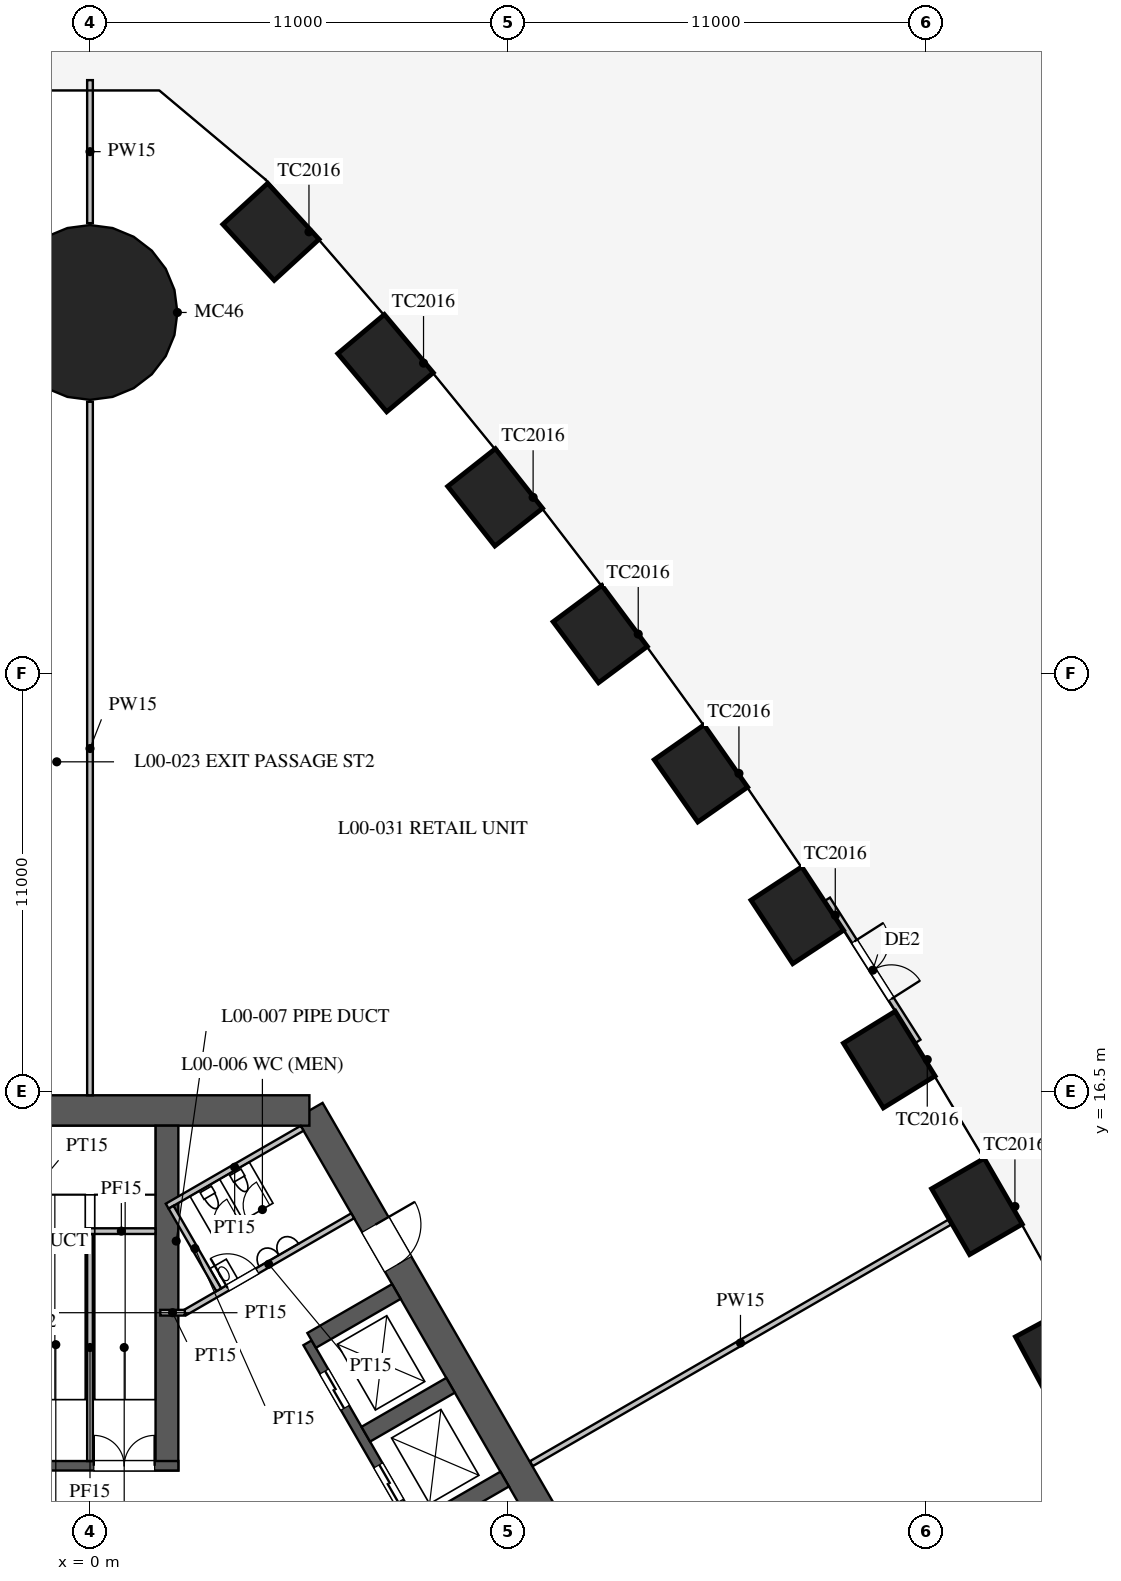
"""IFC4 building model, lengths in metres.
Left out: names, types, materials, properties, quantities, classifications, styles, units other than length and angle.
Written with IfcOpenShell. Run it as: python <this file> out.ifc"""

import sys

from ifc_helpers import new_model, si_unit, direction, frame, frame_2d, origin, origin_2d, place, context, subcontext, project, spatial, polyline, rectangle, circle, outline, extrude, element, fill, save


model = new_model("IFC4")
c1 = context("Model", 3, precision=1e-05, world=origin(), true_north=direction((0.0, 1.0)))
c2 = subcontext(c1, "Body", "Model", "MODEL_VIEW")
j1 = project(units=[si_unit("LENGTHUNIT", "METRE"), si_unit("PLANEANGLEUNIT", "RADIAN")], contexts=[c1])
p1 = place(None, origin())
s1 = spatial("IfcSite", under=j1, at=p1, CompositionType="ELEMENT")
p2 = place(p1, origin())
s2 = spatial("IfcBuilding", under=s1, at=p2, CompositionType="ELEMENT")
p3 = place(p2, origin())
s3 = spatial("IfcBuildingStorey", under=s2, at=p3, CompositionType="ELEMENT", Elevation=0.0)
for number, where, z_axis, x_axis in (
    (1, (25.531, 9.544, 0.0), (0.0, 0.0, 1.0), (-0.475, 0.88, 0.0)),
    (2, (23.338, 13.474, 0.0), (0.0, 0.0, 1.0), (-0.5, 0.866, 0.0)),
    (3, (21.031, 17.339, 0.0), (0.0, 0.0, 1.0), (-0.525, 0.851, 0.0)),
    (4, (18.611, 21.137, 0.0), (0.0, 0.0, 1.0), (-0.549, 0.836, 0.0)),
    (5, (16.076, 24.87, 0.0), (0.0, 0.0, 1.0), (-0.574, 0.819, 0.0)),
    (6, (13.426, 28.536, 0.0), (0.0, 0.0, 1.0), (-0.597, 0.802, 0.0)),
    (7, (10.66, 32.135, 0.0), (0.0, 0.0, 1.0), (-0.62, 0.784, 0.0)),
    (8, (7.776, 35.667, 0.0), (0.0, 0.0, 1.0), (-0.643, 0.766, 0.0)),
    (9, (4.762, 39.122, 0.0), (0.0, 0.0, 1.0), (-0.676, 0.737, 0.0)),
):
    element("IfcColumn", number, at=place(p3, frame(where, z_axis=z_axis, x_axis=x_axis)), inside=s3, PredefinedType="COLUMN", context=c2, shape_type="SweptSolid", body=[
        extrude(rectangle(XDim=2.0, YDim=1.6, at=origin_2d()), origin(), (0.0, 0.0, 1.0), 6.5),
    ])
p4 = place(p3, frame((0.0, 37.0, 0.0), z_axis=(0.0, 0.0, 1.0), x_axis=(1.0, 0.0, 0.0)))
e10 = element("IfcColumn", 10, at=p4, inside=s3, PredefinedType="COLUMN", context=c2, shape_type="SweptSolid", body=[
    extrude(circle(Radius=2.3, at=origin_2d()), origin(), (0.0, 0.0, 1.0), 6.5),
])
p5 = place(p3, frame((16.743, -3.0, 0.0), z_axis=(0.0, 0.0, 1.0), x_axis=(-0.500002442456, 0.866023993627, 0.0)))
e11 = element("IfcWall", 11, at=p5, inside=s3, PredefinedType="SHEAR", context=c2, shape_type="SweptSolid", body=[
    extrude(rectangle(XDim=21.939, YDim=0.8, at=frame_2d((10.97, 0.0))), origin(), (0.0, 0.0, 1.0), 6.5),
])
p6 = place(p5, frame((17.27, 0.0, 0.0)))
e12 = element("IfcOpeningElement", 12, at=p6, cuts=e11, PredefinedType="OPENING", context=c2, shape_type="SweptSolid", body=[
    extrude(rectangle(XDim=1.2, YDim=2.1, at=frame_2d((0.6, 1.05))), frame((0.0, 0.41, 0.0), z_axis=(0.0, -1.0, 0.0), x_axis=(1.0, 0.0, 0.0)), (0.0, 0.0, 1.0), 0.82),
])
p7 = place(p5, frame((3.27, 0.0, 0.0)))
e13 = element("IfcOpeningElement", 13, at=p7, cuts=e11, PredefinedType="OPENING", context=c2, shape_type="SweptSolid", body=[
    extrude(rectangle(XDim=1.6, YDim=2.1, at=frame_2d((0.8, 1.05))), frame((0.0, 0.41, 0.0), z_axis=(0.0, -1.0, 0.0), x_axis=(1.0, 0.0, 0.0)), (0.0, 0.0, 1.0), 0.82),
])
p8 = place(p3, frame((5.773, 16.0, 0.0), z_axis=(0.0, 0.0, 1.0), x_axis=(-1.0, 0.0, 0.0)))
e14 = element("IfcWall", 14, at=p8, inside=s3, PredefinedType="SHEAR", context=c2, shape_type="SweptSolid", body=[
    extrude(rectangle(XDim=11.547, YDim=0.8, at=frame_2d((5.773, 0.0))), origin(), (0.0, 0.0, 1.0), 6.5),
])
p9 = place(p3, frame((11.424, 0.014, 0.0), z_axis=(0.0, 0.0, 1.0), x_axis=(-0.500001763848, 0.866024385424, 0.0)))
e15 = element("IfcWall", 15, at=p9, inside=s3, PredefinedType="SHEAR", context=c2, shape_type="SweptSolid", body=[
    extrude(rectangle(XDim=11.4, YDim=0.25, at=frame_2d((5.7, 0.0))), origin(), (0.0, 0.0, 1.0), 6.5),
])
p10 = place(p9, frame((0.875, 0.0, 0.0)))
e16 = element("IfcOpeningElement", 16, at=p10, cuts=e15, PredefinedType="OPENING", context=c2, shape_type="SweptSolid", body=[
    extrude(rectangle(XDim=1.1, YDim=2.2, at=frame_2d((0.55, 1.1))), frame((0.0, 0.135, 0.0), z_axis=(0.0, -1.0, 0.0), x_axis=(1.0, 0.0, 0.0)), (0.0, 0.0, 1.0), 0.27),
])
p11 = place(p9, frame((3.725, 0.0, 0.0)))
e17 = element("IfcOpeningElement", 17, at=p11, cuts=e15, PredefinedType="OPENING", context=c2, shape_type="SweptSolid", body=[
    extrude(rectangle(XDim=1.1, YDim=2.2, at=frame_2d((0.55, 1.1))), frame((0.0, 0.135, 0.0), z_axis=(0.0, -1.0, 0.0), x_axis=(1.0, 0.0, 0.0)), (0.0, 0.0, 1.0), 0.27),
])
p12 = place(p9, frame((6.575, 0.0, 0.0)))
e18 = element("IfcOpeningElement", 18, at=p12, cuts=e15, PredefinedType="OPENING", context=c2, shape_type="SweptSolid", body=[
    extrude(rectangle(XDim=1.1, YDim=2.2, at=frame_2d((0.55, 1.1))), frame((0.0, 0.135, 0.0), z_axis=(0.0, -1.0, 0.0), x_axis=(1.0, 0.0, 0.0)), (0.0, 0.0, 1.0), 0.27),
])
p13 = place(p9, frame((9.425, 0.0, 0.0)))
e19 = element("IfcOpeningElement", 19, at=p13, cuts=e15, PredefinedType="OPENING", context=c2, shape_type="SweptSolid", body=[
    extrude(rectangle(XDim=1.1, YDim=2.2, at=frame_2d((0.55, 1.1))), frame((0.0, 0.135, 0.0), z_axis=(0.0, -1.0, 0.0), x_axis=(1.0, 0.0, 0.0)), (0.0, 0.0, 1.0), 0.27),
])
for number, where, z_axis, x_axis in (
    (20, (8.682, 5.012, 0.0), (0.0, 0.0, 1.0), (0.866, 0.5, 0.0)),
    (21, (7.257, 7.481, 0.0), (0.0, 0.0, 1.0), (0.866, 0.5, 0.0)),
):
    element("IfcWall", number, at=place(p3, frame(where, z_axis=z_axis, x_axis=x_axis)), inside=s3, PredefinedType="SHEAR", context=c2, shape_type="SweptSolid", body=[
        extrude(rectangle(XDim=2.575, YDim=0.45, at=frame_2d((1.288, 0.0))), origin(), (0.0, 0.0, 1.0), 6.5),
    ])
p14 = place(p3, frame((5.832, 9.949, 0.0), z_axis=(0.0, 0.0, 1.0), x_axis=(0.866029291668, 0.499993265928, 0.0)))
e22 = element("IfcWall", 22, at=p14, inside=s3, PredefinedType="SHEAR", context=c2, shape_type="SweptSolid", body=[
    extrude(rectangle(XDim=2.575, YDim=0.45, at=frame_2d((1.288, 0.0))), origin(), (0.0, 0.0, 1.0), 6.5),
])
p15 = place(p3, frame((2.025, 6.525, 0.0), z_axis=(0.0, 0.0, 1.0), x_axis=(0.0, 1.0, 0.0)))
e23 = element("IfcWall", 23, at=p15, inside=s3, PredefinedType="SHEAR", context=c2, shape_type="SweptSolid", body=[
    extrude(rectangle(XDim=9.075, YDim=0.6, at=frame_2d((4.538, 0.0))), origin(), (0.0, 0.0, 1.0), 6.5),
])
p16 = place(p3, frame((2.325, 6.65, 0.0), z_axis=(0.0, 0.0, 1.0), x_axis=(-1.0, 0.0, 0.0)))
e24 = element("IfcWall", 24, at=p16, inside=s3, PredefinedType="SHEAR", context=c2, shape_type="SweptSolid", body=[
    extrude(rectangle(XDim=4.65, YDim=0.25, at=frame_2d((2.325, 0.0))), origin(), (0.0, 0.0, 1.0), 6.5),
])
p17 = place(p16, frame((0.625, 0.0, 0.0)))
e25 = element("IfcOpeningElement", 25, at=p17, cuts=e24, PredefinedType="OPENING", context=c2, shape_type="SweptSolid", body=[
    extrude(rectangle(XDim=1.6, YDim=2.1, at=frame_2d((0.8, 1.05))), frame((0.0, 0.135, 0.0), z_axis=(0.0, -1.0, 0.0), x_axis=(1.0, 0.0, 0.0)), (0.0, 0.0, 1.0), 0.27),
])
p18 = place(p3, frame((21.79, 17.822, 0.0), z_axis=(0.0, 0.0, 1.0), x_axis=(-0.537210337964, 0.843448310677, 0.0)))
e26 = element("IfcWall", 26, at=p18, inside=s3, PredefinedType="SOLIDWALL", context=c2, shape_type="SweptSolid", body=[
    extrude(rectangle(XDim=4.434, YDim=0.15, at=frame_2d((2.217, 0.0))), origin(), (0.0, 0.0, 1.0), 6.48),
])
p19 = place(p18, frame((1.317, 0.0, 0.0)))
e27 = element("IfcOpeningElement", 27, at=p19, cuts=e26, PredefinedType="OPENING", context=c2, shape_type="SweptSolid", body=[
    extrude(rectangle(XDim=1.8, YDim=3.0, at=frame_2d((0.9, 1.5))), frame((0.0, 0.085, 0.0), z_axis=(0.0, -1.0, 0.0), x_axis=(1.0, 0.0, 0.0)), (0.0, 0.0, 1.0), 0.17),
])
p20 = place(p3, frame((2.495, 10.678, 0.0), z_axis=(0.0, 0.0, 1.0), x_axis=(0.86602216432, 0.500005610874, 0.0)))
e28 = element("IfcWall", 28, at=p20, inside=s3, PredefinedType="PARTITIONING", context=c2, shape_type="SweptSolid", body=[
    extrude(rectangle(XDim=5.1, YDim=0.15, at=frame_2d((2.55, 0.0))), origin(), (0.0, 0.0, 1.0), 6.3),
])
p21 = place(p20, frame((1.3, 0.0, 0.0)))
e29 = element("IfcOpeningElement", 29, at=p21, cuts=e28, PredefinedType="OPENING", context=c2, shape_type="SweptSolid", body=[
    extrude(rectangle(XDim=0.9, YDim=2.1, at=frame_2d((0.45, 1.05))), frame((0.0, 0.085, 0.0), z_axis=(0.0, -1.0, 0.0), x_axis=(1.0, 0.0, 0.0)), (0.0, 0.0, 1.0), 0.17),
])
p22 = place(p3, frame((2.495, 10.678, 0.0), z_axis=(0.0, 0.0, 1.0), x_axis=(-1.0, 0.0, 0.0)))
e30 = element("IfcWall", 30, at=p22, inside=s3, PredefinedType="PARTITIONING", context=c2, shape_type="SweptSolid", body=[
    extrude(rectangle(XDim=0.645, YDim=0.15, at=frame_2d((0.323, 0.0))), origin(), (0.0, 0.0, 1.0), 6.3),
])
p23 = place(p3, frame((2.031, 13.482, 0.0), z_axis=(0.0, 0.0, 1.0), x_axis=(0.866050731258, 0.499956128963, 0.0)))
e31 = element("IfcWall", 31, at=p23, inside=s3, PredefinedType="PARTITIONING", context=c2, shape_type="SweptSolid", body=[
    extrude(rectangle(XDim=4.1, YDim=0.15, at=frame_2d((2.05, 0.0))), origin(), (0.0, 0.0, 1.0), 6.3),
])
p24 = place(p3, frame((3.389, 11.281, 0.0), z_axis=(0.0, 0.0, 1.0), x_axis=(-0.499989096993, 0.866031698547, 0.0)))
e32 = element("IfcWall", 32, at=p24, inside=s3, PredefinedType="PARTITIONING", context=c2, shape_type="SweptSolid", body=[
    extrude(rectangle(XDim=2.51, YDim=0.15, at=frame_2d((1.255, 0.0))), origin(), (0.0, 0.0, 1.0), 6.3),
])
p25 = place(p3, frame((0.0, 16.4, 0.0), z_axis=(0.0, 0.0, 1.0), x_axis=(0.0, 1.0, 0.0)))
e33 = element("IfcWall", 33, at=p25, inside=s3, PredefinedType="PARTITIONING", context=c2, shape_type="SweptSolid", body=[
    extrude(rectangle(XDim=18.25, YDim=0.15, at=frame_2d((9.125, 0.0))), origin(), (0.0, 0.0, 1.0), 4.6),
])
p26 = place(p3, frame((0.0, 39.35, 0.0), z_axis=(0.0, 0.0, 1.0), x_axis=(0.0, 1.0, 0.0)))
e34 = element("IfcWall", 34, at=p26, inside=s3, PredefinedType="PARTITIONING", context=c2, shape_type="SweptSolid", body=[
    extrude(rectangle(XDim=3.764, YDim=0.15, at=frame_2d((1.882, 0.0))), origin(), (0.0, 0.0, 1.0), 4.6),
])
p27 = place(p3, frame((11.613, 6.705, 0.0), z_axis=(0.0, 0.0, 1.0), x_axis=(0.866029791586, 0.499992400027, 0.0)))
e35 = element("IfcWall", 35, at=p27, inside=s3, PredefinedType="PARTITIONING", context=c2, shape_type="SweptSolid", body=[
    extrude(rectangle(XDim=12.709, YDim=0.15, at=frame_2d((6.354, 0.0))), origin(), (0.0, 0.0, 1.0), 5.4),
])
p28 = place(p3, frame((0.0, 6.775, 0.0), z_axis=(0.0, 0.0, 1.0), x_axis=(0.0, 1.0, 0.0)))
e36 = element("IfcWall", 36, at=p28, inside=s3, PredefinedType="PARTITIONING", context=c2, shape_type="SweptSolid", body=[
    extrude(outline(polyline([(0.0, 0.0), (5.975, 0.0), (5.975, 4.014), (1.966, 6.3), (0.0, 6.3), (0.0, 0.0)])), frame((0.0, 0.075, 0.0), z_axis=(0.0, -1.0, 0.0), x_axis=(1.0, 0.0, 0.0)), (0.0, 0.0, 1.0), 0.15),
])
p29 = place(p3, frame((1.725, 12.825, 0.0), z_axis=(0.0, 0.0, 1.0), x_axis=(-1.0, 0.0, 0.0)))
e37 = element("IfcWall", 37, at=p29, inside=s3, PredefinedType="PARTITIONING", context=c2, shape_type="SweptSolid", body=[
    extrude(rectangle(XDim=1.8, YDim=0.15, at=frame_2d((0.9, 0.0))), origin(), (0.0, 0.0, 1.0), 3.575),
])
p30 = place(p19, frame((1.8, 0.0, 0.0), z_axis=(0.0, 0.0, 1.0), x_axis=(-1.0, 0.0, 0.0)))
e38 = element("IfcDoor", 38, at=p30, inside=s3, OperationType="DOUBLE_DOOR_SINGLE_SWING", PredefinedType="DOOR", context=c2, shape_type="SweptSolid", body=[
    extrude(rectangle(XDim=1.8, YDim=3.0, at=frame_2d((0.9, 1.5))), frame((0.0, 0.025, 0.0), z_axis=(0.0, -1.0, 0.0), x_axis=(1.0, 0.0, 0.0)), (0.0, 0.0, 1.0), 0.05),
])
fill(e27, e38)
p31 = place(p21, origin())
e39 = element("IfcDoor", 39, at=p31, inside=s3, OperationType="SINGLE_SWING_LEFT", PredefinedType="DOOR", context=c2, shape_type="SweptSolid", body=[
    extrude(rectangle(XDim=0.9, YDim=2.1, at=frame_2d((0.45, 1.05))), frame((0.0, 0.025, 0.0), z_axis=(0.0, -1.0, 0.0), x_axis=(1.0, 0.0, 0.0)), (0.0, 0.0, 1.0), 0.05),
])
fill(e29, e39)
p32 = place(p6, frame((1.2, 0.0, 0.0), z_axis=(0.0, 0.0, 1.0), x_axis=(-1.0, 0.0, 0.0)))
e40 = element("IfcDoor", 40, at=p32, inside=s3, OperationType="SINGLE_SWING_LEFT", PredefinedType="DOOR", context=c2, shape_type="SweptSolid", body=[
    extrude(rectangle(XDim=1.2, YDim=2.1, at=frame_2d((0.6, 1.05))), frame((0.0, 0.025, 0.0), z_axis=(0.0, -1.0, 0.0), x_axis=(1.0, 0.0, 0.0)), (0.0, 0.0, 1.0), 0.05),
])
fill(e12, e40)
p33 = place(p17, frame((1.6, 0.0, 0.0), z_axis=(0.0, 0.0, 1.0), x_axis=(-1.0, 0.0, 0.0)))
e41 = element("IfcDoor", 41, at=p33, inside=s3, OperationType="DOUBLE_DOOR_SINGLE_SWING", PredefinedType="DOOR", context=c2, shape_type="SweptSolid", body=[
    extrude(rectangle(XDim=1.6, YDim=2.1, at=frame_2d((0.8, 1.05))), frame((0.0, 0.025, 0.0), z_axis=(0.0, -1.0, 0.0), x_axis=(1.0, 0.0, 0.0)), (0.0, 0.0, 1.0), 0.05),
])
fill(e25, e41)
p34 = place(p12, origin())
e42 = element("IfcDoor", 42, at=p34, inside=s3, OperationType="DOUBLE_DOOR_SLIDING", PredefinedType="DOOR", context=c2, shape_type="SweptSolid", body=[
    extrude(rectangle(XDim=1.1, YDim=2.2, at=frame_2d((0.55, 1.1))), frame((0.0, 0.025, 0.0), z_axis=(0.0, -1.0, 0.0), x_axis=(1.0, 0.0, 0.0)), (0.0, 0.0, 1.0), 0.05),
])
fill(e18, e42)
p35 = place(p13, origin())
e43 = element("IfcDoor", 43, at=p35, inside=s3, OperationType="DOUBLE_DOOR_SLIDING", PredefinedType="DOOR", context=c2, shape_type="SweptSolid", body=[
    extrude(rectangle(XDim=1.1, YDim=2.2, at=frame_2d((0.55, 1.1))), frame((0.0, 0.025, 0.0), z_axis=(0.0, -1.0, 0.0), x_axis=(1.0, 0.0, 0.0)), (0.0, 0.0, 1.0), 0.05),
])
fill(e19, e43)
save(model, sys.argv[1])
